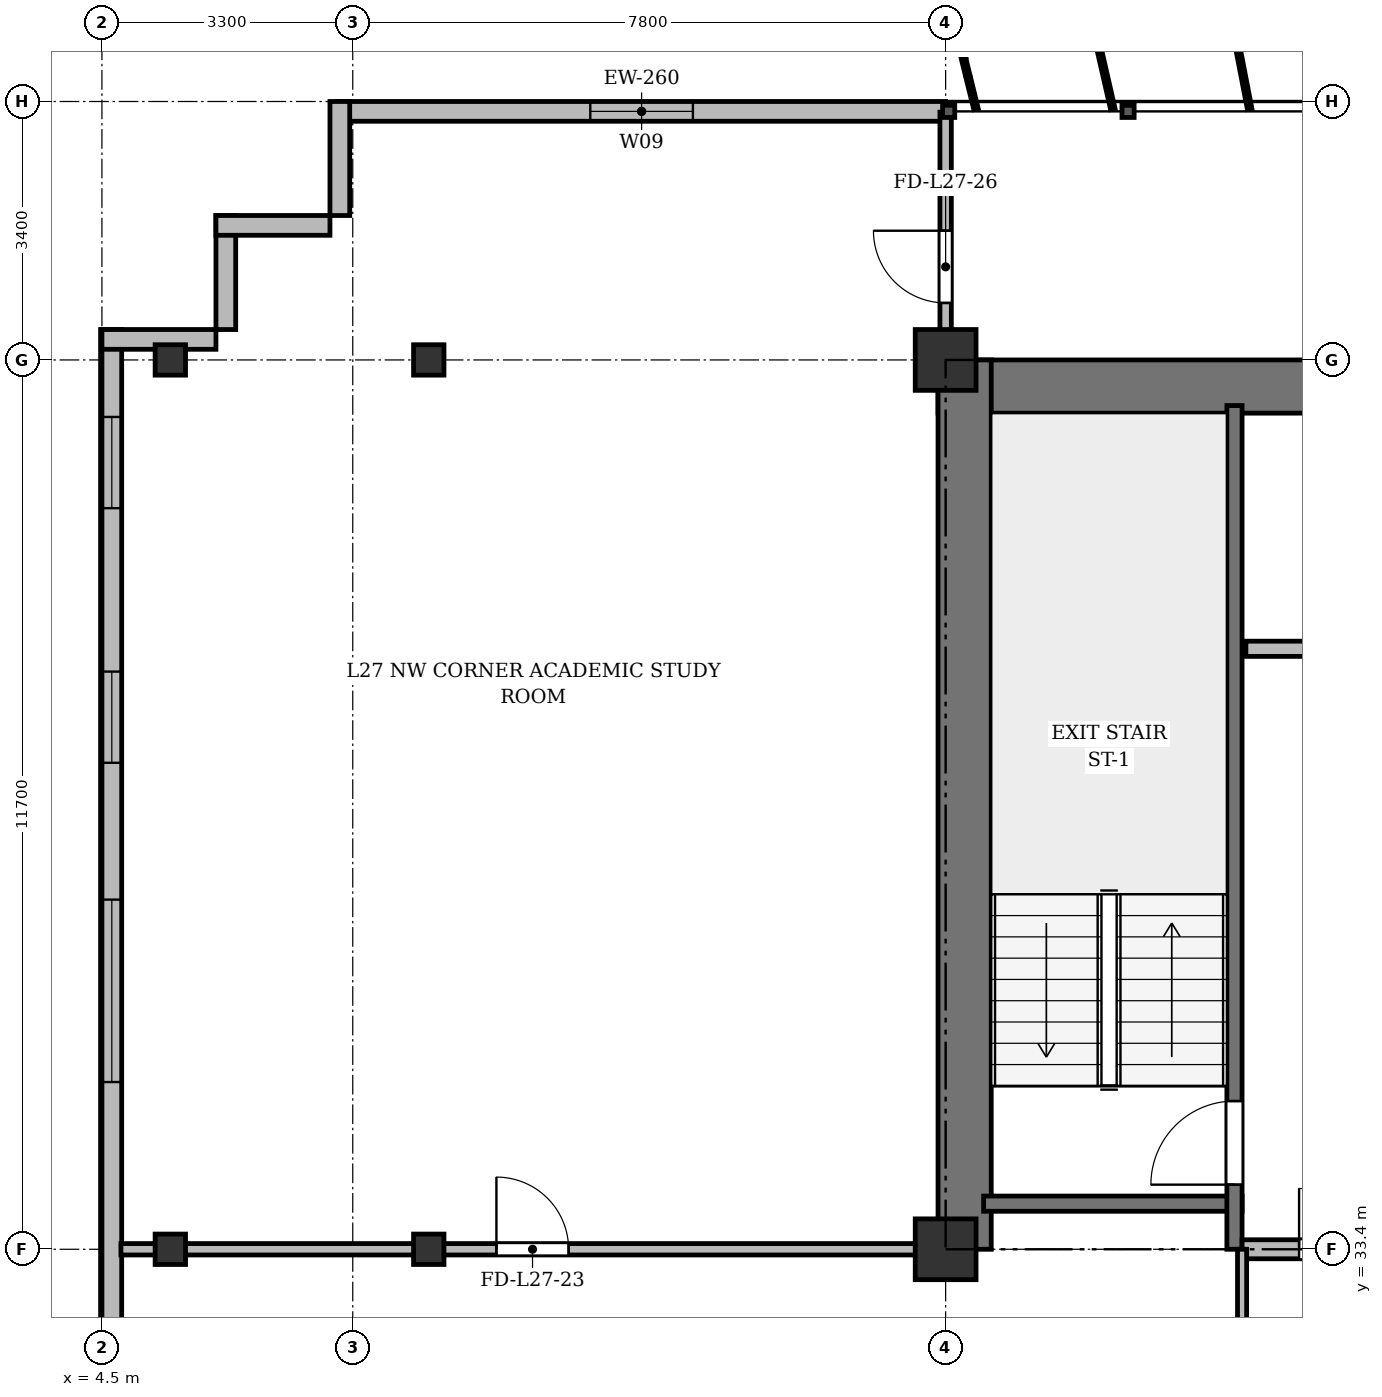
"""IFC4 building model, lengths in metres.
Left out: names, types, materials, properties, quantities, classifications, styles, units other than length and angle.
Written with IfcOpenShell. Run it as: python <this file> out.ifc"""

import sys

from ifc_helpers import new_model, si_unit, direction, frame, frame_2d, origin, origin_2d, place, context, subcontext, project, spatial, rectangle, i_section, extrude, source, transform, mapped, element, fill, save


model = new_model("IFC4")
c1 = context("Model", 3, precision=1e-05, world=origin(), true_north=direction((0.0, 1.0)))
c2 = subcontext(c1, "Body", "Model", "MODEL_VIEW")
j1 = project(units=[si_unit("LENGTHUNIT", "METRE"), si_unit("PLANEANGLEUNIT", "RADIAN")], contexts=[c1])
p1 = place(None, origin())
s1 = spatial("IfcSite", under=j1, at=p1, CompositionType="ELEMENT")
p2 = place(p1, origin())
s2 = spatial("IfcBuilding", under=s1, at=p2, CompositionType="ELEMENT")
p3 = place(p2, frame((0.0, 0.0, 106.9)))
s3 = spatial("IfcBuildingStorey", under=s2, at=p3, CompositionType="ELEMENT", Elevation=106.9)
m1 = source(origin(), c2, "Body", "SweptSolid", [
    extrude(i_section(OverallWidth=0.4, OverallDepth=0.4, WebThickness=0.022, FlangeThickness=0.035, at=origin_2d()), origin(), (0.0, 0.0, 1.0), 3.6),
])
for number, where, z_axis, x_axis in (
    (1, (5.4, 33.4, 0.0), (0.0, 0.0, 1.0), (1.0, 0.0, 0.0)),
    (2, (5.4, 45.1, 0.0), (0.0, 0.0, 1.0), (1.0, 0.0, 0.0)),
    (3, (8.8, 33.4, 0.0), (0.0, 0.0, 1.0), (1.0, 0.0, 0.0)),
    (4, (8.8, 45.1, 0.0), (0.0, 0.0, 1.0), (1.0, 0.0, 0.0)),
):
    element("IfcColumn", number, at=place(p3, frame(where, z_axis=z_axis, x_axis=x_axis)), inside=s3, PredefinedType="COLUMN", context=c2, shape_type="MappedRepresentation", body=[
        mapped(m1, transform((0.0, 0.0, 0.0), x_axis=(1.0, 0.0, 0.0), y_axis=(0.0, 1.0, 0.0), z_axis=(0.0, 0.0, 1.0), scale=1.0)),
    ])
m2 = source(origin(), c2, "Body", "SweptSolid", [
    extrude(rectangle(XDim=0.8, YDim=0.8, at=origin_2d()), origin(), (0.0, 0.0, 1.0), 3.6),
])
for number, where, z_axis, x_axis in (
    (5, (15.6, 33.4, 0.0), (0.0, 0.0, 1.0), (1.0, 0.0, 0.0)),
    (6, (15.6, 45.1, 0.0), (0.0, 0.0, 1.0), (1.0, 0.0, 0.0)),
):
    element("IfcColumn", number, at=place(p3, frame(where, z_axis=z_axis, x_axis=x_axis)), inside=s3, PredefinedType="COLUMN", context=c2, shape_type="MappedRepresentation", body=[
        mapped(m2, transform((0.0, 0.0, 0.0), x_axis=(1.0, 0.0, 0.0), y_axis=(0.0, 1.0, 0.0), z_axis=(0.0, 0.0, 1.0), scale=1.0)),
    ])
p4 = place(p3, frame((7.6, 48.37, 0.0), z_axis=(0.0, 0.0, 1.0), x_axis=(1.0, 0.0, 0.0)))
e7 = element("IfcWall", 7, at=p4, inside=s3, PredefinedType="SOLIDWALL", context=c2, shape_type="SweptSolid", body=[
    extrude(rectangle(XDim=8.0, YDim=0.26, at=frame_2d((4.0, 0.0))), origin(), (0.0, 0.0, 1.0), 3.34),
])
p5 = place(p4, frame((3.325, 0.0, 0.9)))
e8 = element("IfcOpeningElement", 8, at=p5, cuts=e7, PredefinedType="OPENING", context=c2, shape_type="SweptSolid", body=[
    extrude(rectangle(XDim=1.35, YDim=1.5, at=frame_2d((0.675, 0.75))), frame((0.0, 0.14, 0.0), z_axis=(0.0, -1.0, 0.0), x_axis=(1.0, 0.0, 0.0)), (0.0, 0.0, 1.0), 0.28),
])
p6 = place(p3, frame((4.63, 5.9, 0.0), z_axis=(0.0, 0.0, 1.0), x_axis=(0.0, 1.0, 0.0)))
e9 = element("IfcWall", 9, at=p6, inside=s3, PredefinedType="SOLIDWALL", context=c2, shape_type="SweptSolid", body=[
    extrude(rectangle(XDim=39.6, YDim=0.26, at=frame_2d((19.8, 0.0))), origin(), (0.0, 0.0, 1.0), 3.34),
])
p7 = place(p6, frame((1.45, 0.0, 0.92)))
e10 = element("IfcOpeningElement", 10, at=p7, cuts=e9, PredefinedType="OPENING", context=c2, shape_type="SweptSolid", body=[
    extrude(rectangle(XDim=1.2, YDim=1.65, at=frame_2d((0.6, 0.825))), frame((0.0, 0.14, 0.0), z_axis=(0.0, -1.0, 0.0), x_axis=(1.0, 0.0, 0.0)), (0.0, 0.0, 1.0), 0.28),
])
p8 = place(p6, frame((4.3, 0.0, 0.92)))
e11 = element("IfcOpeningElement", 11, at=p8, cuts=e9, PredefinedType="OPENING", context=c2, shape_type="SweptSolid", body=[
    extrude(rectangle(XDim=2.4, YDim=2.1, at=frame_2d((1.2, 1.05))), frame((0.0, 0.14, 0.0), z_axis=(0.0, -1.0, 0.0), x_axis=(1.0, 0.0, 0.0)), (0.0, 0.0, 1.0), 0.28),
])
p9 = place(p6, frame((8.5, 0.0, 0.92)))
e12 = element("IfcOpeningElement", 12, at=p9, cuts=e9, PredefinedType="OPENING", context=c2, shape_type="SweptSolid", body=[
    extrude(rectangle(XDim=2.4, YDim=2.1, at=frame_2d((1.2, 1.05))), frame((0.0, 0.14, 0.0), z_axis=(0.0, -1.0, 0.0), x_axis=(1.0, 0.0, 0.0)), (0.0, 0.0, 1.0), 0.28),
])
p10 = place(p6, frame((15.7, 0.0, 0.92)))
e13 = element("IfcOpeningElement", 13, at=p10, cuts=e9, PredefinedType="OPENING", context=c2, shape_type="SweptSolid", body=[
    extrude(rectangle(XDim=2.4, YDim=2.1, at=frame_2d((1.2, 1.05))), frame((0.0, 0.14, 0.0), z_axis=(0.0, -1.0, 0.0), x_axis=(1.0, 0.0, 0.0)), (0.0, 0.0, 1.0), 0.28),
])
p11 = place(p6, frame((29.7, 0.0, 0.92)))
e14 = element("IfcOpeningElement", 14, at=p11, cuts=e9, PredefinedType="OPENING", context=c2, shape_type="SweptSolid", body=[
    extrude(rectangle(XDim=2.4, YDim=2.1, at=frame_2d((1.2, 1.05))), frame((0.0, 0.14, 0.0), z_axis=(0.0, -1.0, 0.0), x_axis=(1.0, 0.0, 0.0)), (0.0, 0.0, 1.0), 0.28),
])
p12 = place(p6, frame((33.9, 0.0, 0.92)))
e15 = element("IfcOpeningElement", 15, at=p12, cuts=e9, PredefinedType="OPENING", context=c2, shape_type="SweptSolid", body=[
    extrude(rectangle(XDim=1.2, YDim=1.65, at=frame_2d((0.6, 0.825))), frame((0.0, 0.14, 0.0), z_axis=(0.0, -1.0, 0.0), x_axis=(1.0, 0.0, 0.0)), (0.0, 0.0, 1.0), 0.28),
])
p13 = place(p6, frame((37.25, 0.0, 0.92)))
e16 = element("IfcOpeningElement", 16, at=p13, cuts=e9, PredefinedType="OPENING", context=c2, shape_type="SweptSolid", body=[
    extrude(rectangle(XDim=1.2, YDim=1.65, at=frame_2d((0.6, 0.825))), frame((0.0, 0.14, 0.0), z_axis=(0.0, -1.0, 0.0), x_axis=(1.0, 0.0, 0.0)), (0.0, 0.0, 1.0), 0.28),
])
p14 = place(p3, frame((4.5, 45.37, 0.0), z_axis=(0.0, 0.0, 1.0), x_axis=(1.0, 0.0, 0.0)))
e17 = element("IfcWall", 17, at=p14, inside=s3, PredefinedType="SOLIDWALL", context=c2, shape_type="SweptSolid", body=[
    extrude(rectangle(XDim=1.5, YDim=0.26, at=frame_2d((0.75, 0.0))), origin(), (0.0, 0.0, 1.0), 2.752),
])
for number, where, z_axis, x_axis in (
    (18, (6.13, 45.5, 0.0), (0.0, 0.0, 1.0), (0.0, 1.0, 0.0)),
    (19, (6.0, 46.87, 0.0), (0.0, 0.0, 1.0), (1.0, 0.0, 0.0)),
    (20, (7.63, 47.0, 0.0), (0.0, 0.0, 1.0), (0.0, 1.0, 0.0)),
):
    element("IfcWall", number, at=place(p3, frame(where, z_axis=z_axis, x_axis=x_axis)), inside=s3, PredefinedType="SOLIDWALL", context=c2, shape_type="SweptSolid", body=[
        extrude(rectangle(XDim=1.5, YDim=0.26, at=frame_2d((0.75, 0.0))), origin(), (0.0, 0.0, 1.0), 3.34),
    ])
p15 = place(p3, frame((15.5, 44.75, 0.0), z_axis=(0.0, 0.0, 1.0), x_axis=(1.0, 0.0, 0.0)))
e21 = element("IfcWall", 21, at=p15, inside=s3, PredefinedType="SHEAR", context=c2, shape_type="SweptSolid", body=[
    extrude(rectangle(XDim=43.4, YDim=0.7, at=frame_2d((21.7, 0.0))), origin(), (0.0, 0.0, 1.0), 3.34),
])
p16 = place(p3, frame((15.85, 33.4, 0.0), z_axis=(0.0, 0.0, 1.0), x_axis=(0.0, 1.0, 0.0)))
e22 = element("IfcWall", 22, at=p16, inside=s3, PredefinedType="SHEAR", context=c2, shape_type="SweptSolid", body=[
    extrude(rectangle(XDim=11.7, YDim=0.7, at=frame_2d((5.85, 0.0))), origin(), (0.0, 0.0, 1.0), 3.34),
])
p17 = place(p3, frame((16.1, 34.0, 0.0), z_axis=(0.0, 0.0, 1.0), x_axis=(1.0, 0.0, 0.0)))
e23 = element("IfcWall", 23, at=p17, inside=s3, PredefinedType="SHEAR", context=c2, shape_type="SweptSolid", body=[
    extrude(rectangle(XDim=3.4, YDim=0.2, at=frame_2d((1.7, 0.0))), origin(), (0.0, 0.0, 1.0), 3.34),
])
p18 = place(p3, frame((19.4, 33.4, 0.0), z_axis=(0.0, 0.0, 1.0), x_axis=(0.0, 1.0, 0.0)))
e24 = element("IfcWall", 24, at=p18, inside=s3, PredefinedType="SHEAR", context=c2, shape_type="SweptSolid", body=[
    extrude(rectangle(XDim=11.1, YDim=0.2, at=frame_2d((5.55, 0.0))), origin(), (0.0, 0.0, 1.0), 3.34),
])
p19 = place(p18, frame((0.85, 0.0, 0.0)))
e25 = element("IfcOpeningElement", 25, at=p19, cuts=e24, PredefinedType="OPENING", context=c2, shape_type="SweptSolid", body=[
    extrude(rectangle(XDim=1.1, YDim=2.15, at=frame_2d((0.55, 1.075))), frame((0.0, 0.11, 0.0), z_axis=(0.0, -1.0, 0.0), x_axis=(1.0, 0.0, 0.0)), (0.0, 0.0, 1.0), 0.22),
])
p20 = place(p3, frame((19.55, 41.3, 0.0), z_axis=(0.0, 0.0, 1.0), x_axis=(1.0, 0.0, 0.0)))
e26 = element("IfcWall", 26, at=p20, inside=s3, PredefinedType="SOLIDWALL", context=c2, shape_type="SweptSolid", body=[
    extrude(rectangle(XDim=6.75, YDim=0.2, at=frame_2d((3.375, 0.0))), origin(), (0.0, 0.0, 1.0), 3.34),
])
p21 = place(p20, frame((1.7, 0.0, 0.0)))
e27 = element("IfcOpeningElement", 27, at=p21, cuts=e26, PredefinedType="OPENING", context=c2, shape_type="SweptSolid", body=[
    extrude(rectangle(XDim=1.1, YDim=2.15, at=frame_2d((0.55, 1.075))), frame((0.0, 0.11, 0.0), z_axis=(0.0, -1.0, 0.0), x_axis=(1.0, 0.0, 0.0)), (0.0, 0.0, 1.0), 0.22),
])
p22 = place(p20, frame((4.4, 0.0, 0.0)))
e28 = element("IfcOpeningElement", 28, at=p22, cuts=e26, PredefinedType="OPENING", context=c2, shape_type="SweptSolid", body=[
    extrude(rectangle(XDim=1.1, YDim=2.15, at=frame_2d((0.55, 1.075))), frame((0.0, 0.11, 0.0), z_axis=(0.0, -1.0, 0.0), x_axis=(1.0, 0.0, 0.0)), (0.0, 0.0, 1.0), 0.22),
])
p23 = place(p3, frame((19.5, 33.4, 0.0), z_axis=(0.0, 0.0, 1.0), x_axis=(1.0, 0.0, 0.0)))
e29 = element("IfcWall", 29, at=p23, inside=s3, PredefinedType="PARTITIONING", context=c2, shape_type="SweptSolid", body=[
    extrude(rectangle(XDim=6.8, YDim=0.25, at=frame_2d((3.4, 0.0))), origin(), (0.0, 0.0, 1.0), 2.752),
])
p24 = place(p23, frame((0.75, 0.0, 0.0)))
e30 = element("IfcOpeningElement", 30, at=p24, cuts=e29, PredefinedType="OPENING", context=c2, shape_type="SweptSolid", body=[
    extrude(rectangle(XDim=1.6, YDim=2.2, at=frame_2d((0.8, 1.1))), frame((0.0, 0.135, 0.0), z_axis=(0.0, -1.0, 0.0), x_axis=(1.0, 0.0, 0.0)), (0.0, 0.0, 1.0), 0.27),
])
p25 = place(p3, frame((19.5, 29.8, 0.0), z_axis=(0.0, 0.0, 1.0), x_axis=(0.0, 1.0, 0.0)))
e31 = element("IfcWall", 31, at=p25, inside=s3, PredefinedType="PARTITIONING", context=c2, shape_type="SweptSolid", body=[
    extrude(rectangle(XDim=3.6, YDim=0.12, at=frame_2d((1.8, 0.0))), origin(), (0.0, 0.0, 1.0), 2.752),
])
p26 = place(p3, frame((4.75, 33.4, 0.0), z_axis=(0.0, 0.0, 1.0), x_axis=(1.0, 0.0, 0.0)))
e32 = element("IfcWall", 32, at=p26, inside=s3, PredefinedType="PARTITIONING", context=c2, shape_type="SweptSolid", body=[
    extrude(rectangle(XDim=10.85, YDim=0.15, at=frame_2d((5.425, 0.0))), origin(), (0.0, 0.0, 1.0), 2.752),
])
p27 = place(p26, frame((4.94, 0.0, 0.0)))
e33 = element("IfcOpeningElement", 33, at=p27, cuts=e32, PredefinedType="OPENING", context=c2, shape_type="SweptSolid", body=[
    extrude(rectangle(XDim=0.95, YDim=2.15, at=frame_2d((0.475, 1.075))), frame((0.0, 0.085, 0.0), z_axis=(0.0, -1.0, 0.0), x_axis=(1.0, 0.0, 0.0)), (0.0, 0.0, 1.0), 0.17),
])
p28 = place(p3, frame((15.6, 44.75, 0.0), z_axis=(0.0, 0.0, 1.0), x_axis=(0.0, 1.0, 0.0)))
e34 = element("IfcWall", 34, at=p28, inside=s3, PredefinedType="PARTITIONING", context=c2, shape_type="SweptSolid", body=[
    extrude(rectangle(XDim=3.61, YDim=0.15, at=frame_2d((1.805, 0.0))), origin(), (0.0, 0.0, 1.0), 2.84),
])
p29 = place(p28, frame((1.1, 0.0, 0.0)))
e35 = element("IfcOpeningElement", 35, at=p29, cuts=e34, PredefinedType="OPENING", context=c2, shape_type="SweptSolid", body=[
    extrude(rectangle(XDim=0.95, YDim=2.15, at=frame_2d((0.475, 1.075))), frame((0.0, 0.085, 0.0), z_axis=(0.0, -1.0, 0.0), x_axis=(1.0, 0.0, 0.0)), (0.0, 0.0, 1.0), 0.17),
])
m3 = source(origin(), c2, "Body", "SweptSolid", [
    extrude(rectangle(XDim=1.35, YDim=1.5, at=frame_2d((0.675, 0.75))), frame((0.0, 0.03, 0.0), z_axis=(0.0, -1.0, 0.0), x_axis=(1.0, 0.0, 0.0)), (0.0, 0.0, 1.0), 0.06),
])
p30 = place(p5, origin())
e36 = element("IfcWindow", 36, at=p30, inside=s3, PartitioningType="SINGLE_PANEL", PredefinedType="WINDOW", context=c2, shape_type="MappedRepresentation", body=[
    mapped(m3, transform((0.0, 0.0, 0.0), x_axis=(1.0, 0.0, 0.0), y_axis=(0.0, 1.0, 0.0), z_axis=(0.0, 0.0, 1.0), scale=1.0)),
])
fill(e8, e36)
m4 = source(origin(), c2, "Body", "SweptSolid", [
    extrude(rectangle(XDim=2.4, YDim=2.1, at=frame_2d((1.2, 1.05))), frame((0.0, 0.03, 0.0), z_axis=(0.0, -1.0, 0.0), x_axis=(1.0, 0.0, 0.0)), (0.0, 0.0, 1.0), 0.06),
])
p31 = place(p11, origin())
e37 = element("IfcWindow", 37, at=p31, inside=s3, PartitioningType="SINGLE_PANEL", PredefinedType="WINDOW", context=c2, shape_type="MappedRepresentation", body=[
    mapped(m4, transform((0.0, 0.0, 0.0), x_axis=(1.0, 0.0, 0.0), y_axis=(0.0, 1.0, 0.0), z_axis=(0.0, 0.0, 1.0), scale=1.0)),
])
fill(e14, e37)
m5 = source(origin(), c2, "Body", "SweptSolid", [
    extrude(rectangle(XDim=1.2, YDim=1.65, at=frame_2d((0.6, 0.825))), frame((0.0, 0.03, 0.0), z_axis=(0.0, -1.0, 0.0), x_axis=(1.0, 0.0, 0.0)), (0.0, 0.0, 1.0), 0.06),
])
p32 = place(p12, origin())
e38 = element("IfcWindow", 38, at=p32, inside=s3, PartitioningType="SINGLE_PANEL", PredefinedType="WINDOW", context=c2, shape_type="MappedRepresentation", body=[
    mapped(m5, transform((0.0, 0.0, 0.0), x_axis=(1.0, 0.0, 0.0), y_axis=(0.0, 1.0, 0.0), z_axis=(0.0, 0.0, 1.0), scale=1.0)),
])
fill(e15, e38)
p33 = place(p13, origin())
e39 = element("IfcWindow", 39, at=p33, inside=s3, PartitioningType="SINGLE_PANEL", PredefinedType="WINDOW", context=c2, shape_type="MappedRepresentation", body=[
    mapped(m5, transform((0.0, 0.0, 0.0), x_axis=(1.0, 0.0, 0.0), y_axis=(0.0, 1.0, 0.0), z_axis=(0.0, 0.0, 1.0), scale=1.0)),
])
fill(e16, e39)
m6 = source(origin(), c2, "Body", "SweptSolid", [
    extrude(rectangle(XDim=1.1, YDim=2.15, at=frame_2d((0.55, 1.075))), frame((0.0, 0.025, 0.0), z_axis=(0.0, -1.0, 0.0), x_axis=(1.0, 0.0, 0.0)), (0.0, 0.0, 1.0), 0.05),
])
p34 = place(p19, origin())
e40 = element("IfcDoor", 40, at=p34, inside=s3, OperationType="SINGLE_SWING_LEFT", PredefinedType="DOOR", context=c2, shape_type="MappedRepresentation", body=[
    mapped(m6, transform((0.0, 0.0, 0.0), x_axis=(1.0, 0.0, 0.0), y_axis=(0.0, 1.0, 0.0), z_axis=(0.0, 0.0, 1.0), scale=1.0)),
])
fill(e25, e40)
m7 = source(origin(), c2, "Body", "SweptSolid", [
    extrude(rectangle(XDim=1.6, YDim=2.2, at=frame_2d((0.8, 1.1))), frame((0.0, 0.025, 0.0), z_axis=(0.0, -1.0, 0.0), x_axis=(1.0, 0.0, 0.0)), (0.0, 0.0, 1.0), 0.05),
])
p35 = place(p24, origin())
e41 = element("IfcDoor", 41, at=p35, inside=s3, OperationType="DOUBLE_DOOR_SINGLE_SWING", PredefinedType="DOOR", context=c2, shape_type="MappedRepresentation", body=[
    mapped(m7, transform((0.0, 0.0, 0.0), x_axis=(1.0, 0.0, 0.0), y_axis=(0.0, 1.0, 0.0), z_axis=(0.0, 0.0, 1.0), scale=1.0)),
])
fill(e30, e41)
m8 = source(origin(), c2, "Body", "SweptSolid", [
    extrude(rectangle(XDim=0.95, YDim=2.15, at=frame_2d((0.475, 1.075))), frame((0.0, 0.025, 0.0), z_axis=(0.0, -1.0, 0.0), x_axis=(1.0, 0.0, 0.0)), (0.0, 0.0, 1.0), 0.05),
])
p36 = place(p27, origin())
e42 = element("IfcDoor", 42, at=p36, inside=s3, OperationType="SINGLE_SWING_LEFT", PredefinedType="DOOR", context=c2, shape_type="MappedRepresentation", body=[
    mapped(m8, transform((0.0, 0.0, 0.0), x_axis=(1.0, 0.0, 0.0), y_axis=(0.0, 1.0, 0.0), z_axis=(0.0, 0.0, 1.0), scale=1.0)),
])
fill(e33, e42)
p37 = place(p29, origin())
e43 = element("IfcDoor", 43, at=p37, inside=s3, OperationType="SINGLE_SWING_RIGHT", PredefinedType="DOOR", context=c2, shape_type="MappedRepresentation", body=[
    mapped(m8, transform((0.0, 0.0, 0.0), x_axis=(1.0, 0.0, 0.0), y_axis=(0.0, 1.0, 0.0), z_axis=(0.0, 0.0, 1.0), scale=1.0)),
])
fill(e35, e43)
save(model, sys.argv[1])
